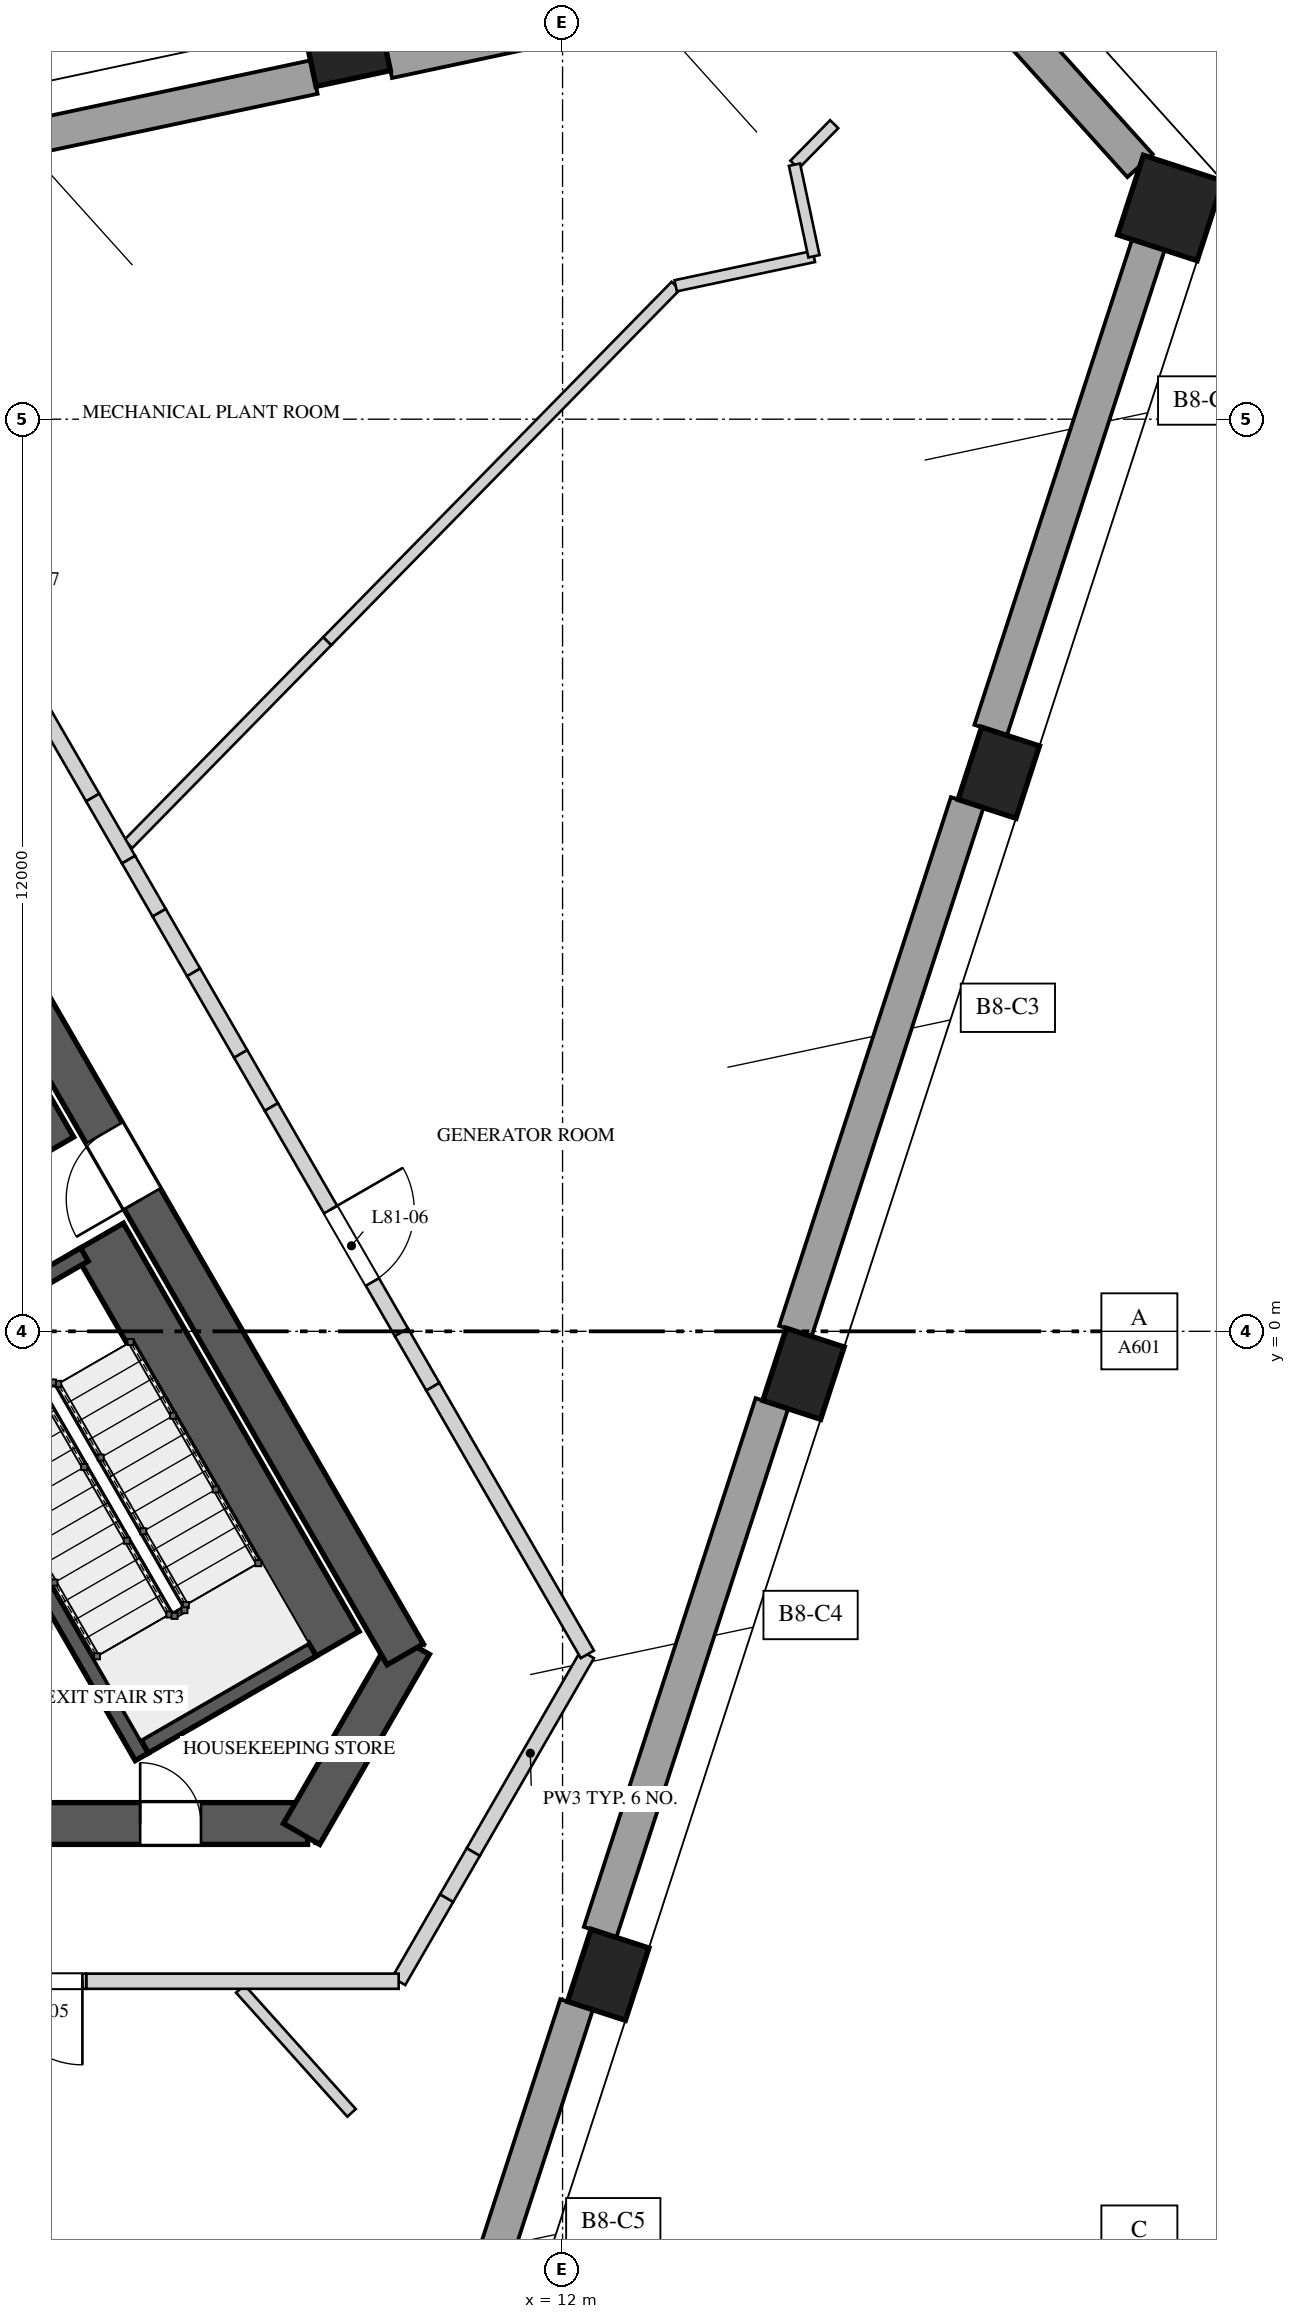
"""IFC4 building model, lengths in metres.
Left out: names, types, materials, properties, quantities, classifications, styles, units other than length and angle.
Written with IfcOpenShell. Run it as: python <this file> out.ifc"""

import sys

from ifc_helpers import new_model, si_unit, direction, frame, frame_2d, origin, origin_2d, place, context, subcontext, project, spatial, polyline, rectangle, outline, extrude, element, fill, save


model = new_model("IFC4")
c1 = context("Model", 3, precision=1e-05, world=origin(), true_north=direction((0.0, 1.0)))
c2 = subcontext(c1, "Body", "Model", "MODEL_VIEW")
j1 = project(units=[si_unit("LENGTHUNIT", "METRE"), si_unit("PLANEANGLEUNIT", "RADIAN")], contexts=[c1])
p1 = place(None, origin())
s1 = spatial("IfcSite", under=j1, at=p1, CompositionType="ELEMENT")
p2 = place(p1, origin())
s2 = spatial("IfcBuilding", under=s1, at=p2, CompositionType="ELEMENT")
p3 = place(p2, frame((0.0, 0.0, 352.4)))
s3 = spatial("IfcBuildingStorey", under=s2, at=p3, CompositionType="ELEMENT", Elevation=352.4)
p4 = place(p3, frame((-8.646, -6.475, 0.0), z_axis=(0.0, 0.0, 1.0), x_axis=(1.0, 0.0, 0.0)))
e1 = element("IfcWall", 1, at=p4, inside=s3, PredefinedType="SHEAR", context=c2, shape_type="SweptSolid", body=[
    extrude(rectangle(XDim=17.292, YDim=0.55, at=frame_2d((8.646, 0.0))), origin(), (0.0, 0.0, 1.0), 4.5),
])
p5 = place(p4, frame((6.851, 0.0, 0.0)))
e2 = element("IfcOpeningElement", 2, at=p5, cuts=e1, PredefinedType="OPENING", context=c2, shape_type="SweptSolid", body=[
    extrude(rectangle(XDim=1.0, YDim=2.4, at=frame_2d((0.5, 1.2))), frame((0.0, 0.285, 0.0), z_axis=(0.0, -1.0, 0.0), x_axis=(1.0, 0.0, 0.0)), (0.0, 0.0, 1.0), 0.57),
])
p6 = place(p4, frame((15.089, 0.0, 0.0)))
e3 = element("IfcOpeningElement", 3, at=p6, cuts=e1, PredefinedType="OPENING", context=c2, shape_type="SweptSolid", body=[
    extrude(rectangle(XDim=0.8, YDim=2.1, at=frame_2d((0.4, 1.05))), frame((0.0, 0.285, 0.0), z_axis=(0.0, -1.0, 0.0), x_axis=(1.0, 0.0, 0.0)), (0.0, 0.0, 1.0), 0.57),
])
p7 = place(p3, frame((8.566, -6.613, 0.0), z_axis=(0.0, 0.0, 1.0), x_axis=(0.499995765644, 0.866027848477, 0.0)))
e4 = element("IfcWall", 4, at=p7, inside=s3, PredefinedType="SHEAR", context=c2, shape_type="SweptSolid", body=[
    extrude(rectangle(XDim=2.887, YDim=0.55, at=frame_2d((1.443, 0.0))), origin(), (0.0, 0.0, 1.0), 4.5),
])
p8 = place(p3, frame((9.93, -4.25, 0.0), z_axis=(0.0, 0.0, 1.0), x_axis=(-0.499994590896, 0.86602852671, 0.0)))
e5 = element("IfcWall", 5, at=p8, inside=s3, PredefinedType="SHEAR", context=c2, shape_type="SweptSolid", body=[
    extrude(rectangle(XDim=17.292, YDim=0.55, at=frame_2d((8.646, 0.0))), origin(), (0.0, 0.0, 1.0), 4.5),
])
p9 = place(p8, frame((6.921, 0.0, 0.0)))
e6 = element("IfcOpeningElement", 6, at=p9, cuts=e5, PredefinedType="OPENING", context=c2, shape_type="SweptSolid", body=[
    extrude(rectangle(XDim=1.0, YDim=2.4, at=frame_2d((0.5, 1.2))), frame((0.0, 0.285, 0.0), z_axis=(0.0, -1.0, 0.0), x_axis=(1.0, 0.0, 0.0)), (0.0, 0.0, 1.0), 0.57),
])
p10 = place(p8, frame((14.626, 0.0, 0.0)))
e7 = element("IfcOpeningElement", 7, at=p10, cuts=e5, PredefinedType="OPENING", context=c2, shape_type="SweptSolid", body=[
    extrude(rectangle(XDim=0.8, YDim=2.1, at=frame_2d((0.4, 1.05))), frame((0.0, 0.285, 0.0), z_axis=(0.0, -1.0, 0.0), x_axis=(1.0, 0.0, 0.0)), (0.0, 0.0, 1.0), 0.57),
])
for number, where, z_axis, x_axis in (
    (8, (12.601, -8.465, 0.0), (0.0, 0.0, 1.0), (0.309, 0.951, 0.0)),
    (9, (15.17, -0.558, 0.0), (0.0, 0.0, 1.0), (0.309, 0.951, 0.0)),
    (10, (17.739, 7.349, 0.0), (0.0, 0.0, 1.0), (0.309, 0.951, 0.0)),
):
    element("IfcColumn", number, at=place(p3, frame(where, z_axis=z_axis, x_axis=x_axis)), inside=s3, PredefinedType="COLUMN", context=c2, shape_type="SweptSolid", body=[
        extrude(rectangle(XDim=1.0, YDim=0.8, at=origin_2d()), origin(), (0.0, 0.0, 1.0), 4.5),
    ])
p11 = place(p3, frame((19.996, 14.779, 0.0), z_axis=(0.0, 0.0, 1.0), x_axis=(0.309016994375, 0.951056516295, 0.0)))
e11 = element("IfcColumn", 11, at=p11, inside=s3, PredefinedType="COLUMN", context=c2, shape_type="SweptSolid", body=[
    extrude(rectangle(XDim=1.1, YDim=1.1, at=origin_2d()), origin(), (0.0, 0.0, 1.0), 4.5),
])
p12 = place(p3, frame((9.163, 16.874, 0.0), z_axis=(0.0, 0.0, 1.0), x_axis=(-0.978147600734, -0.207911690818, 0.0)))
e12 = element("IfcColumn", 12, at=p12, inside=s3, PredefinedType="COLUMN", context=c2, shape_type="SweptSolid", body=[
    extrude(rectangle(XDim=1.0, YDim=0.8, at=origin_2d()), origin(), (0.0, 0.0, 1.0), 4.5),
])
for number, where, z_axis, x_axis in (
    (13, (9.925, -15.812, 0.0), (0.0, 0.0, 1.0), (0.309, 0.951, 0.0)),
    (14, (12.494, -7.905, 0.0), (0.0, 0.0, 1.0), (0.309, 0.951, 0.0)),
    (15, (15.063, 0.002, 0.0), (0.0, 0.0, 1.0), (0.309, 0.951, 0.0)),
):
    element("IfcWall", number, at=place(p3, frame(where, z_axis=z_axis, x_axis=x_axis)), inside=s3, PredefinedType="SOLIDWALL", context=c2, shape_type="SweptSolid", body=[
        extrude(rectangle(XDim=7.314, YDim=0.45, at=frame_2d((3.657, 0.0))), origin(), (0.0, 0.0, 1.0), 3.8),
    ])
p13 = place(p3, frame((17.632, 7.909, 0.0), z_axis=(0.0, 0.0, 1.0), x_axis=(0.309018647645, 0.951055979114, 0.0)))
e16 = element("IfcWall", 16, at=p13, inside=s3, PredefinedType="SOLIDWALL", context=c2, shape_type="SweptSolid", body=[
    extrude(rectangle(XDim=6.714, YDim=0.45, at=frame_2d((3.357, 0.0))), origin(), (0.0, 0.0, 1.0), 3.8),
])
p14 = place(p3, frame((19.598, 15.335, 0.0), z_axis=(0.0, 0.0, 1.0), x_axis=(-0.669109997009, 0.743163381702, 0.0)))
e17 = element("IfcWall", 17, at=p14, inside=s3, PredefinedType="SOLIDWALL", context=c2, shape_type="SweptSolid", body=[
    extrude(rectangle(XDim=3.435, YDim=0.45, at=frame_2d((1.718, 0.0))), origin(), (0.0, 0.0, 1.0), 3.8),
])
p15 = place(p3, frame((8.731, 16.501, 0.0), z_axis=(0.0, 0.0, 1.0), x_axis=(-0.978151299843, -0.207894287118, 0.0)))
e18 = element("IfcWall", 18, at=p15, inside=s3, PredefinedType="SOLIDWALL", context=c2, shape_type="SweptSolid", body=[
    extrude(rectangle(XDim=7.314, YDim=0.45, at=frame_2d((3.657, 0.0))), origin(), (0.0, 0.0, 1.0), 3.8),
])
p16 = place(p3, frame((16.276, 18.105, 0.0), z_axis=(0.0, 0.0, 1.0), x_axis=(-0.978144338977, -0.207927035587, 0.0)))
e19 = element("IfcWall", 19, at=p16, inside=s3, PredefinedType="SOLIDWALL", context=c2, shape_type="SweptSolid", body=[
    extrude(rectangle(XDim=6.714, YDim=0.45, at=frame_2d((3.357, 0.0))), origin(), (0.0, 0.0, 1.0), 3.8),
])
p17 = place(p3, frame((8.998, -4.135, 0.0), z_axis=(0.0, 0.0, 1.0), x_axis=(-0.500009909098, 0.866019682689, 0.0)))
e20 = element("IfcWall", 20, at=p17, inside=s3, PredefinedType="SOLIDWALL", context=c2, shape_type="SweptSolid", body=[
    extrude(rectangle(XDim=6.2, YDim=0.75, at=frame_2d((3.1, 0.0))), origin(), (0.0, 0.0, 1.0), 4.15),
])
p18 = place(p3, frame((6.465, -5.597, 0.0), z_axis=(0.0, 0.0, 1.0), x_axis=(-0.49998037582, 0.866036733513, 0.0)))
e21 = element("IfcWall", 21, at=p18, inside=s3, PredefinedType="SOLIDWALL", context=c2, shape_type="SweptSolid", body=[
    extrude(rectangle(XDim=6.2, YDim=0.2, at=frame_2d((3.1, 0.0))), origin(), (0.0, 0.0, 1.0), 4.15),
])
p19 = place(p3, frame((6.501, -5.461, 0.0), z_axis=(0.0, 0.0, 1.0), x_axis=(0.865989465428, 0.500062241894, 0.0)))
e22 = element("IfcWall", 22, at=p19, inside=s3, PredefinedType="SOLIDWALL", context=c2, shape_type="SweptSolid", body=[
    extrude(rectangle(XDim=2.55, YDim=0.2, at=frame_2d((1.275, 0.0))), origin(), (0.0, 0.0, 1.0), 4.15),
])
p20 = place(p3, frame((3.501, -0.265, 0.0), z_axis=(0.0, 0.0, 1.0), x_axis=(0.866030925526, 0.499990435942, 0.0)))
e23 = element("IfcWall", 23, at=p20, inside=s3, PredefinedType="SOLIDWALL", context=c2, shape_type="SweptSolid", body=[
    extrude(rectangle(XDim=2.55, YDim=0.2, at=frame_2d((1.275, 0.0))), origin(), (0.0, 0.0, 1.0), 4.15),
])
p21 = place(p20, frame((0.725, 0.0, 0.0)))
e24 = element("IfcOpeningElement", 24, at=p21, cuts=e23, PredefinedType="OPENING", context=c2, shape_type="SweptSolid", body=[
    extrude(rectangle(XDim=1.1, YDim=2.4, at=frame_2d((0.55, 1.2))), frame((0.0, 0.11, 0.0), z_axis=(0.0, -1.0, 0.0), x_axis=(1.0, 0.0, 0.0)), (0.0, 0.0, 1.0), 0.22),
])
p22 = place(p3, frame((5.243, 2.369, 0.0), z_axis=(0.0, 0.0, 1.0), x_axis=(-0.500002801628, 0.866023786258, 0.0)))
e25 = element("IfcWall", 25, at=p22, inside=s3, PredefinedType="SOLIDWALL", context=c2, shape_type="SweptSolid", body=[
    extrude(rectangle(XDim=4.9, YDim=0.75, at=frame_2d((2.45, 0.0))), origin(), (0.0, 0.0, 1.0), 4.15),
])
p23 = place(p3, frame((6.287, 6.411, 0.0), z_axis=(0.0, 0.0, 1.0), x_axis=(0.700152348121, 0.713993479956, 0.0)))
e26 = element("IfcWall", 26, at=p23, inside=s3, PredefinedType="PARTITIONING", context=c2, shape_type="SweptSolid", body=[
    extrude(rectangle(XDim=3.74, YDim=0.15, at=frame_2d((1.87, 0.0))), origin(), (0.0, 0.0, 1.0), 3.05),
])
p24 = place(p3, frame((8.905, 9.081, 0.0), z_axis=(0.0, 0.0, 1.0), x_axis=(0.700154559569, 0.713991311372, 0.0)))
e27 = element("IfcWall", 27, at=p24, inside=s3, PredefinedType="PARTITIONING", context=c2, shape_type="SweptSolid", body=[
    extrude(rectangle(XDim=6.546, YDim=0.15, at=frame_2d((3.273, 0.0))), origin(), (0.0, 0.0, 1.0), 4.15),
])
p25 = place(p3, frame((7.76, -8.65, 0.0), z_axis=(0.0, 0.0, 1.0), x_axis=(0.667813245051, -0.744328872028, 0.0)))
e28 = element("IfcWall", 28, at=p25, inside=s3, PredefinedType="PARTITIONING", context=c2, shape_type="SweptSolid", body=[
    extrude(rectangle(XDim=2.192, YDim=0.15, at=frame_2d((1.096, 0.0))), origin(), (0.0, 0.0, 1.0), 4.15),
])
p26 = place(p3, frame((13.489, 13.755, 0.0), z_axis=(0.0, 0.0, 1.0), x_axis=(0.978154843267, 0.207877614461, 0.0)))
e29 = element("IfcWall", 29, at=p26, inside=s3, PredefinedType="PARTITIONING", context=c2, shape_type="SweptSolid", body=[
    extrude(rectangle(XDim=1.858, YDim=0.15, at=frame_2d((0.929, 0.0))), origin(), (0.0, 0.0, 1.0), 4.15),
])
p27 = place(p3, frame((15.051, 15.349, 0.0), z_axis=(0.0, 0.0, 1.0), x_axis=(0.700199040738, 0.713947689505, 0.0)))
e30 = element("IfcWall", 30, at=p27, inside=s3, PredefinedType="PARTITIONING", context=c2, shape_type="SweptSolid", body=[
    extrude(rectangle(XDim=0.746, YDim=0.15, at=frame_2d((0.373, 0.0))), origin(), (0.0, 0.0, 1.0), 4.15),
])
p28 = place(p3, frame((15.307, 14.144, 0.0), z_axis=(0.0, 0.0, 1.0), x_axis=(-0.207918018685, 0.978146255683, 0.0)))
e31 = element("IfcWall", 31, at=p28, inside=s3, PredefinedType="PARTITIONING", context=c2, shape_type="SweptSolid", body=[
    extrude(rectangle(XDim=1.232, YDim=0.15, at=frame_2d((0.616, 0.0))), origin(), (0.0, 0.0, 1.0), 4.15),
])
p29 = place(p3, frame((12.326, -4.25, 0.0), z_axis=(0.0, 0.0, 1.0), x_axis=(-0.500003959331, -0.866023117852, 0.0)))
e32 = element("IfcWall", 32, at=p29, inside=s3, PredefinedType="SOLIDWALL", context=c2, shape_type="SweptSolid", body=[
    extrude(rectangle(XDim=3.003, YDim=0.2, at=frame_2d((1.501, 0.0))), origin(), (0.0, 0.0, 1.0), 4.15),
])
p30 = place(p3, frame((10.825, -6.851, 0.0), z_axis=(0.0, 0.0, 1.0), x_axis=(-0.500144223137, -0.865942120504, 0.0)))
e33 = element("IfcWall", 33, at=p30, inside=s3, PredefinedType="SOLIDWALL", context=c2, shape_type="SweptSolid", body=[
    extrude(rectangle(XDim=0.701, YDim=0.2, at=frame_2d((0.351, 0.0))), origin(), (0.0, 0.0, 1.0), 3.45),
])
p31 = place(p3, frame((10.474, -7.458, 0.0), z_axis=(0.0, 0.0, 1.0), x_axis=(-0.499929168788, -0.866066294342, 0.0)))
e34 = element("IfcWall", 34, at=p31, inside=s3, PredefinedType="SOLIDWALL", context=c2, shape_type="SweptSolid", body=[
    extrude(rectangle(XDim=1.261, YDim=0.2, at=frame_2d((0.63, 0.0))), origin(), (0.0, 0.0, 1.0), 4.15),
])
p32 = place(p3, frame((9.844, -8.55, 0.0), z_axis=(0.0, 0.0, 1.0), x_axis=(-1.0, 0.0, 0.0)))
e35 = element("IfcWall", 35, at=p32, inside=s3, PredefinedType="SOLIDWALL", context=c2, shape_type="SweptSolid", body=[
    extrude(rectangle(XDim=4.111, YDim=0.2, at=frame_2d((2.055, 0.0))), origin(), (0.0, 0.0, 1.0), 4.15),
])
p33 = place(p3, frame((5.733, -8.55, 0.0), z_axis=(0.0, 0.0, 1.0), x_axis=(-1.0, 0.0, 0.0)))
e36 = element("IfcWall", 36, at=p33, inside=s3, PredefinedType="SOLIDWALL", context=c2, shape_type="SweptSolid", body=[
    extrude(outline(polyline([(0.0, 0.0), (1.2, 0.0), (1.2, 4.15), (0.905, 4.15), (0.905, 3.45), (0.0, 3.45), (0.0, 0.0)])), frame((0.0, 0.1, 0.0), z_axis=(0.0, -1.0, 0.0), x_axis=(1.0, 0.0, 0.0)), (0.0, 0.0, 1.0), 0.2),
])
p34 = place(p33, frame((0.05, 0.0, 0.0)))
e37 = element("IfcOpeningElement", 37, at=p34, cuts=e36, PredefinedType="OPENING", context=c2, shape_type="SweptSolid", body=[
    extrude(rectangle(XDim=1.1, YDim=2.4, at=frame_2d((0.55, 1.2))), frame((0.0, 0.11, 0.0), z_axis=(0.0, -1.0, 0.0), x_axis=(1.0, 0.0, 0.0)), (0.0, 0.0, 1.0), 0.22),
])
p35 = place(p3, frame((4.99, 8.457, 0.0), z_axis=(0.0, 0.0, 1.0), x_axis=(0.500024536802, -0.866011236992, 0.0)))
e38 = element("IfcWall", 38, at=p35, inside=s3, PredefinedType="SOLIDWALL", context=c2, shape_type="SweptSolid", body=[
    extrude(rectangle(XDim=1.656, YDim=0.2, at=frame_2d((0.828, 0.0))), origin(), (0.0, 0.0, 1.0), 4.15),
])
p36 = place(p3, frame((5.818, 7.023, 0.0), z_axis=(0.0, 0.0, 1.0), x_axis=(0.500006071987, -0.866021898093, 0.0)))
e39 = element("IfcWall", 39, at=p36, inside=s3, PredefinedType="SOLIDWALL", context=c2, shape_type="SweptSolid", body=[
    extrude(rectangle(XDim=0.944, YDim=0.2, at=frame_2d((0.472, 0.0))), origin(), (0.0, 0.0, 1.0), 3.05),
])
p37 = place(p3, frame((6.29, 6.205, 0.0), z_axis=(0.0, 0.0, 1.0), x_axis=(0.500045602705, -0.86599907345, 0.0)))
e40 = element("IfcWall", 40, at=p37, inside=s3, PredefinedType="SOLIDWALL", context=c2, shape_type="SweptSolid", body=[
    extrude(rectangle(XDim=0.807, YDim=0.2, at=frame_2d((0.403, 0.0))), origin(), (0.0, 0.0, 1.0), 4.15),
])
p38 = place(p3, frame((6.693, 5.507, 0.0), z_axis=(0.0, 0.0, 1.0), x_axis=(0.499994660107, -0.866028486751, 0.0)))
e41 = element("IfcWall", 41, at=p38, inside=s3, PredefinedType="SOLIDWALL", context=c2, shape_type="SweptSolid", body=[
    extrude(rectangle(XDim=0.906, YDim=0.2, at=frame_2d((0.453, 0.0))), origin(), (0.0, 0.0, 1.0), 3.05),
])
p39 = place(p3, frame((7.146, 4.722, 0.0), z_axis=(0.0, 0.0, 1.0), x_axis=(0.499955681623, -0.866050989499, 0.0)))
e42 = element("IfcWall", 42, at=p39, inside=s3, PredefinedType="SOLIDWALL", context=c2, shape_type="SweptSolid", body=[
    extrude(rectangle(XDim=1.238, YDim=0.2, at=frame_2d((0.619, 0.0))), origin(), (0.0, 0.0, 1.0), 4.15),
])
p40 = place(p3, frame((7.765, 3.65, 0.0), z_axis=(0.0, 0.0, 1.0), x_axis=(0.500141487433, -0.865943700565, 0.0)))
e43 = element("IfcWall", 43, at=p40, inside=s3, PredefinedType="SOLIDWALL", context=c2, shape_type="SweptSolid", body=[
    extrude(rectangle(XDim=0.807, YDim=0.2, at=frame_2d((0.403, 0.0))), origin(), (0.0, 0.0, 1.0), 3.25),
])
p41 = place(p3, frame((8.169, 2.951, 0.0), z_axis=(0.0, 0.0, 1.0), x_axis=(0.499959115548, -0.866049007147, 0.0)))
e44 = element("IfcWall", 44, at=p41, inside=s3, PredefinedType="SOLIDWALL", context=c2, shape_type="SweptSolid", body=[
    extrude(rectangle(XDim=3.423, YDim=0.2, at=frame_2d((1.711, 0.0))), origin(), (0.0, 0.0, 1.0), 4.15),
])
p42 = place(p41, frame((1.558, 0.0, 0.0)))
e45 = element("IfcOpeningElement", 45, at=p42, cuts=e44, PredefinedType="OPENING", context=c2, shape_type="SweptSolid", body=[
    extrude(rectangle(XDim=1.1, YDim=2.4, at=frame_2d((0.55, 1.2))), frame((0.0, 0.11, 0.0), z_axis=(0.0, -1.0, 0.0), x_axis=(1.0, 0.0, 0.0)), (0.0, 0.0, 1.0), 0.22),
])
p43 = place(p3, frame((9.88, -0.013, 0.0), z_axis=(0.0, 0.0, 1.0), x_axis=(0.499952654668, -0.866052736899, 0.0)))
e46 = element("IfcWall", 46, at=p43, inside=s3, PredefinedType="SOLIDWALL", context=c2, shape_type="SweptSolid", body=[
    extrude(rectangle(XDim=0.826, YDim=0.2, at=frame_2d((0.413, 0.0))), origin(), (0.0, 0.0, 1.0), 3.45),
])
p44 = place(p3, frame((10.293, -0.729, 0.0), z_axis=(0.0, 0.0, 1.0), x_axis=(0.50002046505, -0.86601358796, 0.0)))
e47 = element("IfcWall", 47, at=p44, inside=s3, PredefinedType="SOLIDWALL", context=c2, shape_type="SweptSolid", body=[
    extrude(rectangle(XDim=4.066, YDim=0.2, at=frame_2d((2.033, 0.0))), origin(), (0.0, 0.0, 1.0), 4.15),
])
p45 = place(p9, origin())
e48 = element("IfcDoor", 48, at=p45, inside=s3, OperationType="SINGLE_SWING_RIGHT", PredefinedType="DOOR", context=c2, shape_type="SweptSolid", body=[
    extrude(rectangle(XDim=1.0, YDim=2.4, at=frame_2d((0.5, 1.2))), frame((0.0, 0.025, 0.0), z_axis=(0.0, -1.0, 0.0), x_axis=(1.0, 0.0, 0.0)), (0.0, 0.0, 1.0), 0.05),
])
fill(e6, e48)
p46 = place(p6, origin())
e49 = element("IfcDoor", 49, at=p46, inside=s3, OperationType="SINGLE_SWING_LEFT", PredefinedType="DOOR", context=c2, shape_type="SweptSolid", body=[
    extrude(rectangle(XDim=0.8, YDim=2.1, at=frame_2d((0.4, 1.05))), frame((0.0, 0.025, 0.0), z_axis=(0.0, -1.0, 0.0), x_axis=(1.0, 0.0, 0.0)), (0.0, 0.0, 1.0), 0.05),
])
fill(e3, e49)
p47 = place(p34, origin())
e50 = element("IfcDoor", 50, at=p47, inside=s3, OperationType="SINGLE_SWING_LEFT", PredefinedType="DOOR", context=c2, shape_type="SweptSolid", body=[
    extrude(rectangle(XDim=1.1, YDim=2.4, at=frame_2d((0.55, 1.2))), frame((0.0, 0.025, 0.0), z_axis=(0.0, -1.0, 0.0), x_axis=(1.0, 0.0, 0.0)), (0.0, 0.0, 1.0), 0.05),
])
fill(e37, e50)
p48 = place(p42, origin())
e51 = element("IfcDoor", 51, at=p48, inside=s3, OperationType="SINGLE_SWING_RIGHT", PredefinedType="DOOR", context=c2, shape_type="SweptSolid", body=[
    extrude(rectangle(XDim=1.1, YDim=2.4, at=frame_2d((0.55, 1.2))), frame((0.0, 0.025, 0.0), z_axis=(0.0, -1.0, 0.0), x_axis=(1.0, 0.0, 0.0)), (0.0, 0.0, 1.0), 0.05),
])
fill(e45, e51)
save(model, sys.argv[1])
